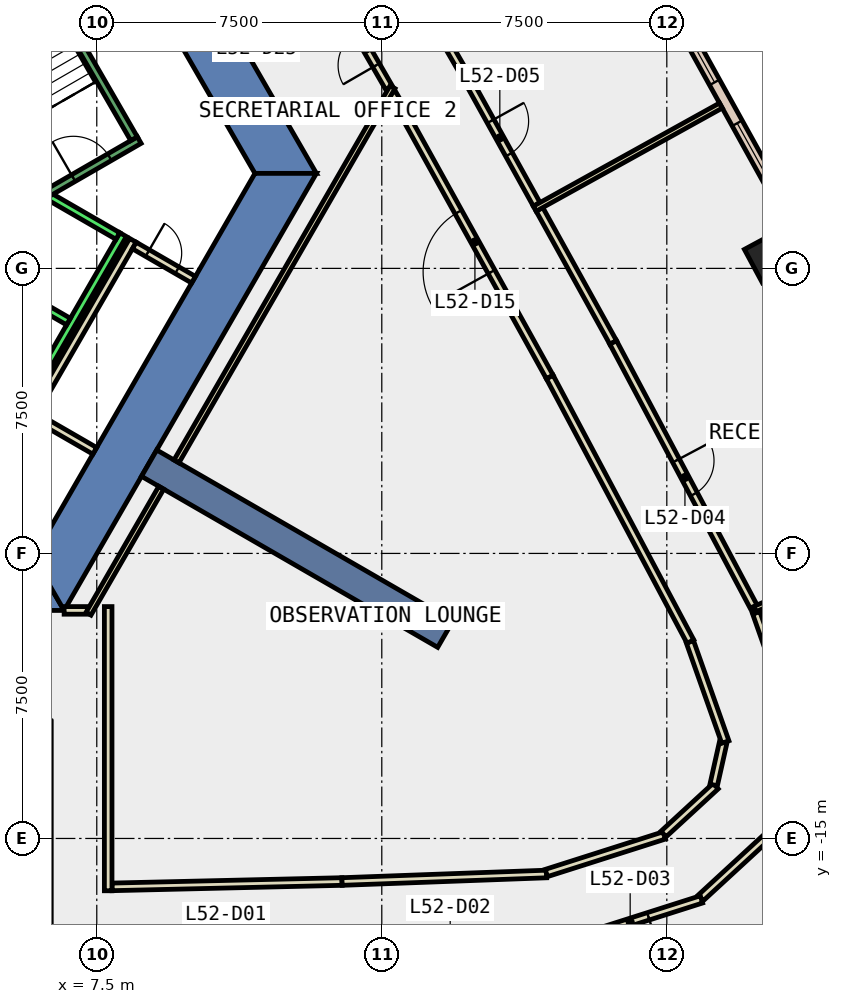
"""IFC4 building model, lengths in metres.
Left out: names, types, materials, properties, quantities, classifications, styles, units other than length and angle.
Written with IfcOpenShell. Run it as: python <this file> out.ifc"""

import sys

from ifc_helpers import new_model, si_unit, direction, frame, frame_2d, origin, origin_2d, place, context, subcontext, project, spatial, polyline, rectangle, outline, extrude, element, fill, save


model = new_model("IFC4")
c1 = context("Model", 3, precision=1e-05, world=origin(), true_north=direction((0.0, 1.0)))
c2 = subcontext(c1, "Body", "Model", "MODEL_VIEW")
j1 = project(units=[si_unit("LENGTHUNIT", "METRE"), si_unit("PLANEANGLEUNIT", "RADIAN")], contexts=[c1])
p1 = place(None, origin())
s1 = spatial("IfcSite", under=j1, at=p1, CompositionType="ELEMENT")
p2 = place(p1, origin())
s2 = spatial("IfcBuilding", under=s1, at=p2, CompositionType="ELEMENT")
p3 = place(p2, frame((0.0, 0.0, 231.8)))
s3 = spatial("IfcBuildingStorey", under=s2, at=p3, CompositionType="ELEMENT", Elevation=231.8)
p4 = place(p3, frame((25.395, 0.391, -0.4), z_axis=(0.0, 0.0, 1.0), x_axis=(-0.474134310084, 0.880452529102, 0.0)))
e1 = element("IfcColumn", 1, at=p4, inside=s3, PredefinedType="COLUMN", context=c2, shape_type="SweptSolid", body=[
    extrude(rectangle(XDim=1.0, YDim=1.4, at=origin_2d()), origin(), (0.0, 0.0, 1.0), 4.0),
])
p5 = place(p3, frame((0.0, 0.0, -0.4)))
e2 = element("IfcWall", 2, at=p5, inside=s3, PredefinedType="SHEAR", context=c2, shape_type="SweptSolid", body=[
    extrude(outline(polyline([(8.084, 11.498), (6.871, 10.798), (11.662, 2.5), (13.279, 2.5), (8.084, 11.498)])), origin(), (0.0, 0.0, 1.0), 4.0),
])
p6 = place(p3, frame((0.0, 0.0, -0.4)))
e3 = element("IfcWall", 3, at=p6, inside=s3, PredefinedType="SHEAR", context=c2, shape_type="SweptSolid", body=[
    extrude(outline(polyline([(5.75, -7.6), (5.75, -9.0), (6.64, -9.0), (5.831, -7.6), (5.75, -7.6)])), origin(), (0.0, 0.0, 1.0), 4.0),
])
p7 = place(p3, frame((0.0, 0.0, -0.4)))
e4 = element("IfcWall", 4, at=p7, inside=s3, PredefinedType="SHEAR", context=c2, shape_type="SweptSolid", body=[
    extrude(outline(polyline([(6.64, -9.0), (13.279, 2.5), (11.662, 2.5), (5.831, -7.6), (6.64, -9.0)])), origin(), (0.0, 0.0, 1.0), 4.0),
])
p8 = place(p3, frame((8.877, -5.125, -0.4), z_axis=(0.0, 0.0, 1.0), x_axis=(0.866017533419, -0.500013631625, 0.0)))
e5 = element("IfcWall", 5, at=p8, inside=s3, PredefinedType="SHEAR", context=c2, shape_type="SweptSolid", body=[
    extrude(rectangle(XDim=9.0, YDim=0.8, at=frame_2d((4.5, 0.0))), origin(), (0.0, 0.0, 1.0), 4.0),
])
p9 = place(p3, frame((25.813, 1.183, 0.0), z_axis=(0.0, 0.0, 1.0), x_axis=(-0.484742980126, 0.874656643043, 0.0)))
e6 = element("IfcWall", 6, at=p9, inside=s3, PredefinedType="STANDARD", context=c2, shape_type="SweptSolid", body=[
    extrude(rectangle(XDim=7.258, YDim=0.3, at=frame_2d((3.629, 0.0))), origin(), (0.0, 0.0, 1.0), 3.6),
])
p10 = place(p9, frame((0.614, 0.0, 0.9)))
e7 = element("IfcOpeningElement", 7, at=p10, cuts=e6, PredefinedType="OPENING", context=c2, shape_type="SweptSolid", body=[
    extrude(rectangle(XDim=2.4, YDim=2.6, at=frame_2d((1.2, 1.3))), frame((0.0, 0.16, 0.0), z_axis=(0.0, -1.0, 0.0), x_axis=(1.0, 0.0, 0.0)), (0.0, 0.0, 1.0), 0.32),
])
p11 = place(p9, frame((4.243, 0.0, 0.9)))
e8 = element("IfcOpeningElement", 8, at=p11, cuts=e6, PredefinedType="OPENING", context=c2, shape_type="SweptSolid", body=[
    extrude(rectangle(XDim=2.4, YDim=2.6, at=frame_2d((1.2, 1.3))), frame((0.0, 0.16, 0.0), z_axis=(0.0, -1.0, 0.0), x_axis=(1.0, 0.0, 0.0)), (0.0, 0.0, 1.0), 0.32),
])
p12 = place(p3, frame((15.194, 4.747, 0.0), z_axis=(0.0, 0.0, 1.0), x_axis=(-0.500140598757, 0.865944213836, 0.0)))
e9 = element("IfcWall", 9, at=p12, inside=s3, PredefinedType="PARTITIONING", context=c2, shape_type="SweptSolid", body=[
    extrude(rectangle(XDim=2.375, YDim=0.2, at=frame_2d((1.188, 0.0))), origin(), (0.0, 0.0, 1.0), 3.6),
])
p13 = place(p12, frame((0.688, 0.0, 0.0)))
e10 = element("IfcOpeningElement", 10, at=p13, cuts=e9, PredefinedType="OPENING", context=c2, shape_type="SweptSolid", body=[
    extrude(rectangle(XDim=1.0, YDim=2.1, at=frame_2d((0.5, 1.05))), frame((0.0, 0.11, 0.0), z_axis=(0.0, -1.0, 0.0), x_axis=(1.0, 0.0, 0.0)), (0.0, 0.0, 1.0), 0.22),
])
p14 = place(p3, frame((7.9, -16.274, 0.0), z_axis=(0.0, 0.0, 1.0), x_axis=(0.999729409829, 0.023261709391, 0.0)))
e11 = element("IfcWall", 11, at=p14, inside=s3, PredefinedType="PARTITIONING", context=c2, shape_type="SweptSolid", body=[
    extrude(rectangle(XDim=6.056, YDim=0.2, at=frame_2d((3.028, 0.0))), origin(), (0.0, 0.0, 1.0), 3.6),
])
p15 = place(p3, frame((13.954, -16.133, 0.0), z_axis=(0.0, 0.0, 1.0), x_axis=(0.999323686931, 0.036771847101, 0.0)))
e12 = element("IfcWall", 12, at=p15, inside=s3, PredefinedType="PARTITIONING", context=c2, shape_type="SweptSolid", body=[
    extrude(rectangle(XDim=5.385, YDim=0.2, at=frame_2d((2.692, 0.0))), origin(), (0.0, 0.0, 1.0), 3.6),
])
p16 = place(p3, frame((19.33, -15.909, 0.0), z_axis=(0.0, 0.0, 1.0), x_axis=(0.952831275662, 0.303500510906, 0.0)))
e13 = element("IfcWall", 13, at=p16, inside=s3, PredefinedType="PARTITIONING", context=c2, shape_type="SweptSolid", body=[
    extrude(rectangle(XDim=3.259, YDim=0.2, at=frame_2d((1.629, 0.0))), origin(), (0.0, 0.0, 1.0), 3.6),
])
p17 = place(p3, frame((22.414, -14.883, 0.0), z_axis=(0.0, 0.0, 1.0), x_axis=(0.735983257634, 0.676999737432, 0.0)))
e14 = element("IfcWall", 14, at=p17, inside=s3, PredefinedType="PARTITIONING", context=c2, shape_type="SweptSolid", body=[
    extrude(rectangle(XDim=1.863, YDim=0.2, at=frame_2d((0.931, 0.0))), origin(), (0.0, 0.0, 1.0), 3.6),
])
p18 = place(p3, frame((23.733, -13.592, 0.0), z_axis=(0.0, 0.0, 1.0), x_axis=(0.218746220366, 0.975781784558, 0.0)))
e15 = element("IfcWall", 15, at=p18, inside=s3, PredefinedType="PARTITIONING", context=c2, shape_type="SweptSolid", body=[
    extrude(rectangle(XDim=1.153, YDim=0.2, at=frame_2d((0.576, 0.0))), origin(), (0.0, 0.0, 1.0), 3.6),
])
p19 = place(p3, frame((24.04, -12.463, 0.0), z_axis=(0.0, 0.0, 1.0), x_axis=(-0.333166995935, 0.942867834227, 0.0)))
e16 = element("IfcWall", 16, at=p19, inside=s3, PredefinedType="PARTITIONING", context=c2, shape_type="SweptSolid", body=[
    extrude(rectangle(XDim=2.798, YDim=0.2, at=frame_2d((1.399, 0.0))), origin(), (0.0, 0.0, 1.0), 3.6),
])
p20 = place(p3, frame((23.121, -9.819, 0.0), z_axis=(0.0, 0.0, 1.0), x_axis=(-0.469450210487, 0.882958945746, 0.0)))
e17 = element("IfcWall", 17, at=p20, inside=s3, PredefinedType="PARTITIONING", context=c2, shape_type="SweptSolid", body=[
    extrude(rectangle(XDim=7.886, YDim=0.2, at=frame_2d((3.943, 0.0))), origin(), (0.0, 0.0, 1.0), 3.6),
])
p21 = place(p3, frame((19.419, -2.856, 0.0), z_axis=(0.0, 0.0, 1.0), x_axis=(-0.484683114876, 0.874689818252, 0.0)))
e18 = element("IfcWall", 18, at=p21, inside=s3, PredefinedType="PARTITIONING", context=c2, shape_type="SweptSolid", body=[
    extrude(rectangle(XDim=8.123, YDim=0.2, at=frame_2d((4.062, 0.0))), origin(), (0.0, 0.0, 1.0), 3.6),
])
p22 = place(p21, frame((3.161, 0.0, 0.0)))
e19 = element("IfcOpeningElement", 19, at=p22, cuts=e18, PredefinedType="OPENING", context=c2, shape_type="SweptSolid", body=[
    extrude(rectangle(XDim=1.8, YDim=2.1, at=frame_2d((0.9, 1.05))), frame((0.0, 0.11, 0.0), z_axis=(0.0, -1.0, 0.0), x_axis=(1.0, 0.0, 0.0)), (0.0, 0.0, 1.0), 0.22),
])
p23 = place(p3, frame((15.482, 4.249, 0.0), z_axis=(0.0, 0.0, 1.0), x_axis=(-0.500832493767, 0.865544229481, 0.0)))
e20 = element("IfcWall", 20, at=p23, inside=s3, PredefinedType="PARTITIONING", context=c2, shape_type="SweptSolid", body=[
    extrude(rectangle(XDim=0.425, YDim=0.2, at=frame_2d((0.212, 0.0))), origin(), (0.0, 0.0, 1.0), 3.6),
])
p24 = place(p3, frame((24.852, -9.059, 0.0), z_axis=(0.0, 0.0, 1.0), x_axis=(0.333116923704, -0.942885526001, 0.0)))
e21 = element("IfcWall", 21, at=p24, inside=s3, PredefinedType="PARTITIONING", context=c2, shape_type="SweptSolid", body=[
    extrude(rectangle(XDim=3.485, YDim=0.2, at=frame_2d((1.742, 0.0))), origin(), (0.0, 0.0, 1.0), 3.6),
])
p25 = place(p3, frame((25.509, -14.617, 0.0), z_axis=(0.0, 0.0, 1.0), x_axis=(-0.735846476242, -0.677148405745, 0.0)))
e22 = element("IfcWall", 22, at=p25, inside=s3, PredefinedType="PARTITIONING", context=c2, shape_type="SweptSolid", body=[
    extrude(rectangle(XDim=2.878, YDim=0.2, at=frame_2d((1.439, 0.0))), origin(), (0.0, 0.0, 1.0), 3.6),
])
p26 = place(p3, frame((23.412, -16.603, 0.0), z_axis=(0.0, 0.0, 1.0), x_axis=(-0.952838618572, -0.303477457083, 0.0)))
e23 = element("IfcWall", 23, at=p26, inside=s3, PredefinedType="PARTITIONING", context=c2, shape_type="SweptSolid", body=[
    extrude(rectangle(XDim=3.938, YDim=0.2, at=frame_2d((1.969, 0.0))), origin(), (0.0, 0.0, 1.0), 3.6),
])
p27 = place(p26, frame((1.469, 0.0, 0.0)))
e24 = element("IfcOpeningElement", 24, at=p27, cuts=e23, PredefinedType="OPENING", context=c2, shape_type="SweptSolid", body=[
    extrude(rectangle(XDim=1.0, YDim=2.1, at=frame_2d((0.5, 1.05))), frame((0.0, 0.11, 0.0), z_axis=(0.0, -1.0, 0.0), x_axis=(1.0, 0.0, 0.0)), (0.0, 0.0, 1.0), 0.22),
])
p28 = place(p3, frame((19.149, 1.553, 0.0), z_axis=(0.0, 0.0, 1.0), x_axis=(0.484622593188, -0.874723351793, 0.0)))
e25 = element("IfcWall", 25, at=p28, inside=s3, PredefinedType="PARTITIONING", context=c2, shape_type="SweptSolid", body=[
    extrude(rectangle(XDim=4.003, YDim=0.2, at=frame_2d((2.002, 0.0))), origin(), (0.0, 0.0, 1.0), 3.6),
])
p29 = place(p3, frame((21.089, -1.949, 0.0), z_axis=(0.0, 0.0, 1.0), x_axis=(0.469431794586, -0.882968736837, 0.0)))
e26 = element("IfcWall", 26, at=p29, inside=s3, PredefinedType="PARTITIONING", context=c2, shape_type="SweptSolid", body=[
    extrude(rectangle(XDim=8.046, YDim=0.2, at=frame_2d((4.023, 0.0))), origin(), (0.0, 0.0, 1.0), 3.6),
])
p30 = place(p29, frame((3.522, 0.0, 0.0)))
e27 = element("IfcOpeningElement", 27, at=p30, cuts=e26, PredefinedType="OPENING", context=c2, shape_type="SweptSolid", body=[
    extrude(rectangle(XDim=1.0, YDim=2.1, at=frame_2d((0.5, 1.05))), frame((0.0, 0.11, 0.0), z_axis=(0.0, -1.0, 0.0), x_axis=(1.0, 0.0, 0.0)), (0.0, 0.0, 1.0), 0.22),
])
p31 = place(p3, frame((15.135, 8.65, 0.0), z_axis=(0.0, 0.0, 1.0), x_axis=(0.500102734445, -0.865966081899, 0.0)))
e28 = element("IfcWall", 28, at=p31, inside=s3, PredefinedType="PARTITIONING", context=c2, shape_type="SweptSolid", body=[
    extrude(rectangle(XDim=4.001, YDim=0.2, at=frame_2d((2.0, 0.0))), origin(), (0.0, 0.0, 1.0), 3.6),
])
p32 = place(p3, frame((17.136, 5.185, 0.0), z_axis=(0.0, 0.0, 1.0), x_axis=(0.484679349661, -0.874691904623, 0.0)))
e29 = element("IfcWall", 29, at=p32, inside=s3, PredefinedType="PARTITIONING", context=c2, shape_type="SweptSolid", body=[
    extrude(rectangle(XDim=4.002, YDim=0.2, at=frame_2d((2.001, 0.0))), origin(), (0.0, 0.0, 1.0), 3.6),
])
p33 = place(p32, frame((1.501, 0.0, 0.0)))
e30 = element("IfcOpeningElement", 30, at=p33, cuts=e29, PredefinedType="OPENING", context=c2, shape_type="SweptSolid", body=[
    extrude(rectangle(XDim=1.0, YDim=2.1, at=frame_2d((0.5, 1.05))), frame((0.0, 0.11, 0.0), z_axis=(0.0, -1.0, 0.0), x_axis=(1.0, 0.0, 0.0)), (0.0, 0.0, 1.0), 0.22),
])
p34 = place(p3, frame((5.751, -3.938, 0.0), z_axis=(0.0, 0.0, 1.0), x_axis=(0.500034260056, 0.866005622828, 0.0)))
e31 = element("IfcWall", 31, at=p34, inside=s3, PredefinedType="PARTITIONING", context=c2, shape_type="SweptSolid", body=[
    extrude(rectangle(XDim=5.399, YDim=0.2, at=frame_2d((2.7, 0.0))), origin(), (0.0, 0.0, 1.0), 3.6),
])
p35 = place(p3, frame((8.488, 0.602, 0.0), z_axis=(0.0, 0.0, 1.0), x_axis=(0.86585331735, -0.500297944063, 0.0)))
e32 = element("IfcWall", 32, at=p35, inside=s3, PredefinedType="PARTITIONING", context=c2, shape_type="SweptSolid", body=[
    extrude(rectangle(XDim=1.799, YDim=0.2, at=frame_2d((0.9, 0.0))), origin(), (0.0, 0.0, 1.0), 3.6),
])
p36 = place(p35, frame((0.4, 0.0, 0.0)))
e33 = element("IfcOpeningElement", 33, at=p36, cuts=e32, PredefinedType="OPENING", context=c2, shape_type="SweptSolid", body=[
    extrude(rectangle(XDim=0.9, YDim=2.1, at=frame_2d((0.45, 1.05))), frame((0.0, 0.11, 0.0), z_axis=(0.0, -1.0, 0.0), x_axis=(1.0, 0.0, 0.0)), (0.0, 0.0, 1.0), 0.22),
])
p37 = place(p3, frame((7.447, -4.801, 0.0), z_axis=(0.0, 0.0, 1.0), x_axis=(-0.866316547501, 0.499495384889, 0.0)))
e34 = element("IfcWall", 34, at=p37, inside=s3, PredefinedType="PARTITIONING", context=c2, shape_type="SweptSolid", body=[
    extrude(rectangle(XDim=1.8, YDim=0.2, at=frame_2d((0.9, 0.0))), origin(), (0.0, 0.0, 1.0), 3.6),
])
p38 = place(p3, frame((6.641, -8.999, 0.0), z_axis=(0.0, 0.0, 1.0), x_axis=(1.0, 0.0, 0.0)))
e35 = element("IfcWall", 35, at=p38, inside=s3, PredefinedType="PARTITIONING", context=c2, shape_type="SweptSolid", body=[
    extrude(rectangle(XDim=0.617, YDim=0.2, at=frame_2d((0.309, 0.0))), origin(), (0.0, 0.0, 1.0), 3.6),
])
p39 = place(p3, frame((7.283, -9.086, 0.0), z_axis=(0.0, 0.0, 1.0), x_axis=(0.500035303972, 0.866005020067, 0.0)))
e36 = element("IfcWall", 36, at=p39, inside=s3, PredefinedType="PARTITIONING", context=c2, shape_type="SweptSolid", body=[
    extrude(rectangle(XDim=3.828, YDim=0.15, at=frame_2d((1.914, 0.0))), origin(), (0.0, 0.0, 1.0), 3.6),
])
p40 = place(p3, frame((7.8, -8.899, 0.0), z_axis=(0.0, 0.0, 1.0), x_axis=(0.0, -1.0, 0.0)))
e37 = element("IfcWall", 37, at=p40, inside=s3, PredefinedType="PARTITIONING", context=c2, shape_type="SweptSolid", body=[
    extrude(rectangle(XDim=7.477, YDim=0.2, at=frame_2d((3.739, 0.0))), origin(), (0.0, 0.0, 1.0), 3.6),
])
p41 = place(p3, frame((24.819, -8.964, 0.0), z_axis=(0.0, 0.0, 1.0), x_axis=(0.915460951187, 0.402406817602, 0.0)))
e38 = element("IfcWall", 38, at=p41, inside=s3, PredefinedType="PARTITIONING", context=c2, shape_type="SweptSolid", body=[
    extrude(rectangle(XDim=4.192, YDim=0.15, at=frame_2d((2.096, 0.0))), origin(), (0.0, 0.0, 1.0), 3.6),
])
p42 = place(p3, frame((19.025, 1.57, 0.0), z_axis=(0.0, 0.0, 1.0), x_axis=(0.874714019242, 0.484639437666, 0.0)))
e39 = element("IfcWall", 39, at=p42, inside=s3, PredefinedType="PARTITIONING", context=c2, shape_type="SweptSolid", body=[
    extrude(rectangle(XDim=5.6, YDim=0.15, at=frame_2d((2.8, 0.0))), origin(), (0.0, 0.0, 1.0), 3.6),
])
p43 = place(p3, frame((9.597, -5.079, 0.0), z_axis=(0.0, 0.0, 1.0), x_axis=(0.499949193323, 0.866054735046, 0.0)))
e40 = element("IfcWall", 40, at=p43, inside=s3, PredefinedType="PARTITIONING", context=c2, shape_type="SweptSolid", body=[
    extrude(rectangle(XDim=11.371, YDim=0.15, at=frame_2d((5.686, 0.0))), origin(), (0.0, 0.0, 1.0), 3.6),
])
p44 = place(p3, frame((5.492, -3.788, 0.0), z_axis=(0.0, 0.0, 1.0), x_axis=(0.500034260056, 0.866005622828, 0.0)))
e41 = element("IfcWall", 41, at=p44, inside=s3, PredefinedType="STANDARD", context=c2, shape_type="SweptSolid", body=[
    extrude(rectangle(XDim=5.399, YDim=0.2, at=frame_2d((2.7, 0.0))), origin(), (0.0, 0.0, 1.0), 3.6),
])
for number, where, z_axis, x_axis in (
    (42, (4.677, -0.2, 0.0), (0.0, 0.0, 1.0), (0.866, -0.5, 0.0)),
    (43, (5.977, 2.052, 0.0), (0.0, 0.0, 1.0), (0.866, -0.5, 0.0)),
):
    element("IfcWall", number, at=place(p3, frame(where, z_axis=z_axis, x_axis=x_axis)), inside=s3, PredefinedType="STANDARD", context=c2, shape_type="SweptSolid", body=[
        extrude(rectangle(XDim=2.399, YDim=0.2, at=frame_2d((1.2, 0.0))), origin(), (0.0, 0.0, 1.0), 3.6),
    ])
p45 = place(p3, frame((4.806, 1.176, 0.0), z_axis=(0.0, 0.0, 1.0), x_axis=(0.866059941101, 0.499940174841, 0.0)))
e44 = element("IfcWall", 44, at=p45, inside=s3, PredefinedType="STANDARD", context=c2, shape_type="SweptSolid", body=[
    extrude(rectangle(XDim=4.4, YDim=0.2, at=frame_2d((2.2, 0.0))), origin(), (0.0, 0.0, 1.0), 3.6),
])
p46 = place(p45, frame((2.4, 0.0, 0.0)))
e45 = element("IfcOpeningElement", 45, at=p46, cuts=e44, PredefinedType="OPENING", context=c2, shape_type="SweptSolid", body=[
    extrude(rectangle(XDim=1.1, YDim=2.2, at=frame_2d((0.55, 1.1))), frame((0.0, 0.11, 0.0), z_axis=(0.0, -1.0, 0.0), x_axis=(1.0, 0.0, 0.0)), (0.0, 0.0, 1.0), 0.22),
])
p47 = place(p3, frame((8.48, 3.412, 0.0), z_axis=(0.0, 0.0, 1.0), x_axis=(-0.499978703459, 0.866037698999, 0.0)))
e46 = element("IfcWall", 46, at=p47, inside=s3, PredefinedType="STANDARD", context=c2, shape_type="SweptSolid", body=[
    extrude(rectangle(XDim=6.9, YDim=0.2, at=frame_2d((3.45, 0.0))), origin(), (0.0, 0.0, 1.0), 3.6),
])
p48 = place(p10, origin())
e47 = element("IfcWindow", 47, at=p48, inside=s3, PartitioningType="SINGLE_PANEL", PredefinedType="WINDOW", context=c2, shape_type="SweptSolid", body=[
    extrude(rectangle(XDim=2.4, YDim=2.6, at=frame_2d((1.2, 1.3))), frame((0.0, 0.03, 0.0), z_axis=(0.0, -1.0, 0.0), x_axis=(1.0, 0.0, 0.0)), (0.0, 0.0, 1.0), 0.06),
])
fill(e7, e47)
p49 = place(p11, origin())
e48 = element("IfcWindow", 48, at=p49, inside=s3, PartitioningType="SINGLE_PANEL", PredefinedType="WINDOW", context=c2, shape_type="SweptSolid", body=[
    extrude(rectangle(XDim=2.4, YDim=2.6, at=frame_2d((1.2, 1.3))), frame((0.0, 0.03, 0.0), z_axis=(0.0, -1.0, 0.0), x_axis=(1.0, 0.0, 0.0)), (0.0, 0.0, 1.0), 0.06),
])
fill(e8, e48)
p50 = place(p27, origin())
e49 = element("IfcDoor", 49, at=p50, inside=s3, OperationType="SINGLE_SWING_LEFT", PredefinedType="DOOR", context=c2, shape_type="SweptSolid", body=[
    extrude(rectangle(XDim=1.0, YDim=2.1, at=frame_2d((0.5, 1.05))), frame((0.0, 0.025, 0.0), z_axis=(0.0, -1.0, 0.0), x_axis=(1.0, 0.0, 0.0)), (0.0, 0.0, 1.0), 0.05),
])
fill(e24, e49)
p51 = place(p30, origin())
e50 = element("IfcDoor", 50, at=p51, inside=s3, OperationType="SINGLE_SWING_LEFT", PredefinedType="DOOR", context=c2, shape_type="SweptSolid", body=[
    extrude(rectangle(XDim=1.0, YDim=2.1, at=frame_2d((0.5, 1.05))), frame((0.0, 0.025, 0.0), z_axis=(0.0, -1.0, 0.0), x_axis=(1.0, 0.0, 0.0)), (0.0, 0.0, 1.0), 0.05),
])
fill(e27, e50)
p52 = place(p33, origin())
e51 = element("IfcDoor", 51, at=p52, inside=s3, OperationType="SINGLE_SWING_LEFT", PredefinedType="DOOR", context=c2, shape_type="SweptSolid", body=[
    extrude(rectangle(XDim=1.0, YDim=2.1, at=frame_2d((0.5, 1.05))), frame((0.0, 0.025, 0.0), z_axis=(0.0, -1.0, 0.0), x_axis=(1.0, 0.0, 0.0)), (0.0, 0.0, 1.0), 0.05),
])
fill(e30, e51)
p53 = place(p22, origin())
e52 = element("IfcDoor", 52, at=p53, inside=s3, OperationType="DOUBLE_DOOR_SINGLE_SWING", PredefinedType="DOOR", context=c2, shape_type="SweptSolid", body=[
    extrude(rectangle(XDim=1.8, YDim=2.1, at=frame_2d((0.9, 1.05))), frame((0.0, 0.025, 0.0), z_axis=(0.0, -1.0, 0.0), x_axis=(1.0, 0.0, 0.0)), (0.0, 0.0, 1.0), 0.05),
])
fill(e19, e52)
p54 = place(p13, origin())
e53 = element("IfcDoor", 53, at=p54, inside=s3, OperationType="SINGLE_SWING_LEFT", PredefinedType="DOOR", context=c2, shape_type="SweptSolid", body=[
    extrude(rectangle(XDim=1.0, YDim=2.1, at=frame_2d((0.5, 1.05))), frame((0.0, 0.025, 0.0), z_axis=(0.0, -1.0, 0.0), x_axis=(1.0, 0.0, 0.0)), (0.0, 0.0, 1.0), 0.05),
])
fill(e10, e53)
p55 = place(p36, origin())
e54 = element("IfcDoor", 54, at=p55, inside=s3, OperationType="SINGLE_SWING_RIGHT", PredefinedType="DOOR", context=c2, shape_type="SweptSolid", body=[
    extrude(rectangle(XDim=0.9, YDim=2.1, at=frame_2d((0.45, 1.05))), frame((0.0, 0.025, 0.0), z_axis=(0.0, -1.0, 0.0), x_axis=(1.0, 0.0, 0.0)), (0.0, 0.0, 1.0), 0.05),
])
fill(e33, e54)
p56 = place(p46, origin())
e55 = element("IfcDoor", 55, at=p56, inside=s3, OperationType="SINGLE_SWING_LEFT", PredefinedType="DOOR", context=c2, shape_type="SweptSolid", body=[
    extrude(rectangle(XDim=1.1, YDim=2.2, at=frame_2d((0.55, 1.1))), frame((0.0, 0.025, 0.0), z_axis=(0.0, -1.0, 0.0), x_axis=(1.0, 0.0, 0.0)), (0.0, 0.0, 1.0), 0.05),
])
fill(e45, e55)
save(model, sys.argv[1])
